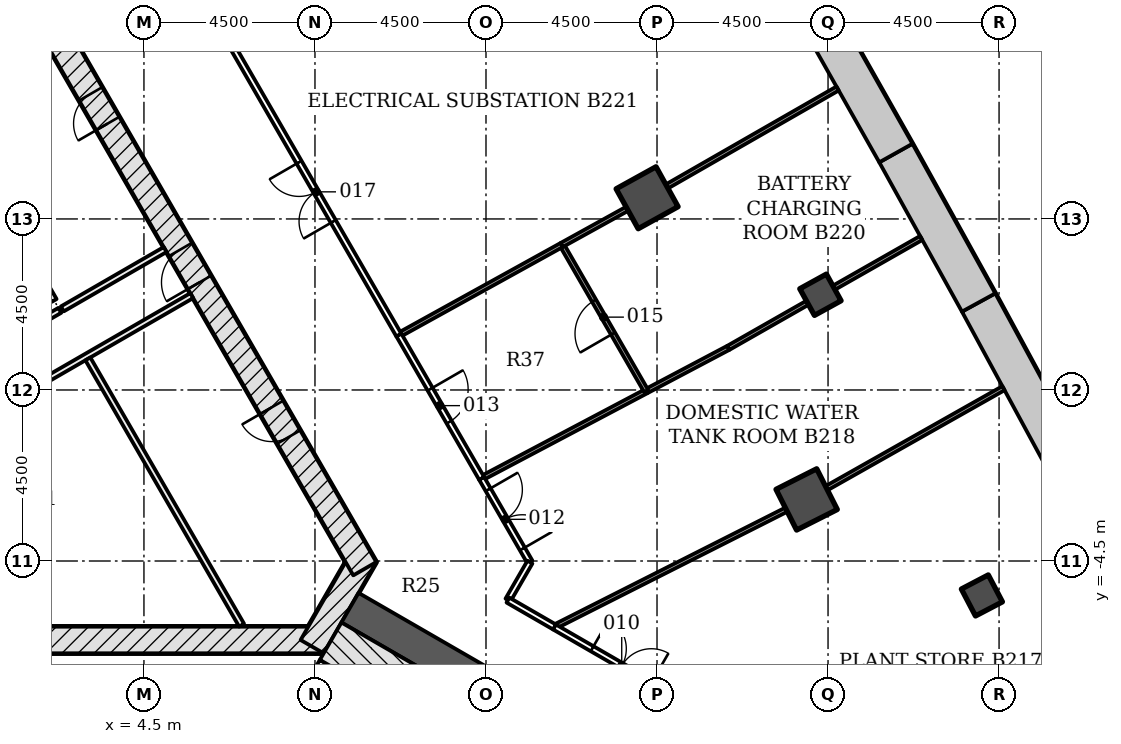
"""IFC4 building model, lengths in metres.
Left out: names, types, materials, properties, quantities, classifications, styles, units other than length and angle.
Written with IfcOpenShell. Run it as: python <this file> out.ifc"""

import sys

from ifc_helpers import new_model, si_unit, direction, frame, frame_2d, origin, origin_2d, place, context, subcontext, project, spatial, polyline, rectangle, outline, extrude, element, fill, save


model = new_model("IFC4")
c1 = context("Model", 3, precision=1e-05, world=origin(), true_north=direction((0.0, 1.0)))
c2 = subcontext(c1, "Body", "Model", "MODEL_VIEW")
j1 = project(units=[si_unit("LENGTHUNIT", "METRE"), si_unit("PLANEANGLEUNIT", "RADIAN")], contexts=[c1])
p1 = place(None, origin())
s1 = spatial("IfcSite", under=j1, at=p1, CompositionType="ELEMENT")
p2 = place(p1, origin())
s2 = spatial("IfcBuilding", under=s1, at=p2, CompositionType="ELEMENT")
p3 = place(p2, frame((0.0, 0.0, -9.0)))
s3 = spatial("IfcBuildingStorey", under=s2, at=p3, CompositionType="ELEMENT", Elevation=-9.0)
p4 = place(p3, origin())
e1 = element("IfcWall", 1, at=p4, inside=s3, PredefinedType="SOLIDWALL", context=c2, shape_type="SweptSolid", body=[
    extrude(outline(polyline([(29.045, -1.415), (26.901, 2.542), (26.024, 2.062), (28.164, -1.887), (29.045, -1.415)])), origin(), (0.0, 0.0, 1.0), 4.2),
])
p5 = place(p3, origin())
e2 = element("IfcWall", 2, at=p5, inside=s3, PredefinedType="SOLIDWALL", context=c2, shape_type="SweptSolid", body=[
    extrude(outline(polyline([(26.901, 2.542), (24.721, 6.479), (23.848, 5.99), (26.024, 2.062), (26.901, 2.542)])), origin(), (0.0, 0.0, 1.0), 4.2),
])
p6 = place(p3, origin())
e3 = element("IfcWall", 3, at=p6, inside=s3, PredefinedType="SOLIDWALL", context=c2, shape_type="SweptSolid", body=[
    extrude(outline(polyline([(24.721, 6.479), (22.506, 10.396), (21.638, 9.9), (23.848, 5.99), (24.721, 6.479)])), origin(), (0.0, 0.0, 1.0), 4.2),
])
for number, where, z_axis, x_axis in (
    (4, (21.937, -2.88, -0.3), (0.0, 0.0, 1.0), (0.893, 0.451, 0.0)),
    (5, (17.739, 5.058, -0.3), (0.0, 0.0, 1.0), (0.875, 0.484, 0.0)),
):
    element("IfcColumn", number, at=place(p3, frame(where, z_axis=z_axis, x_axis=x_axis)), inside=s3, PredefinedType="COLUMN", context=c2, shape_type="SweptSolid", body=[
        extrude(rectangle(XDim=1.2, YDim=1.2, at=origin_2d()), origin(), (0.0, 0.0, 1.0), 4.5),
    ])
for number, where, z_axis, x_axis in (
    (6, (26.548, -5.406, -0.3), (0.0, 0.0, 1.0), (0.886, 0.464, 0.0)),
    (7, (22.3, 2.506, -0.3), (0.0, 0.0, 1.0), (0.876, 0.482, 0.0)),
):
    element("IfcColumn", number, at=place(p3, frame(where, z_axis=z_axis, x_axis=x_axis)), inside=s3, PredefinedType="COLUMN", context=c2, shape_type="SweptSolid", body=[
        extrude(rectangle(XDim=0.8, YDim=0.8, at=origin_2d()), origin(), (0.0, 0.0, 1.0), 4.5),
    ])
p7 = place(p3, frame((-9.229, -6.578, -0.3), z_axis=(0.0, 0.0, 1.0), x_axis=(1.0, 0.0, 0.0)))
e8 = element("IfcWall", 8, at=p7, inside=s3, PredefinedType="SHEAR", context=c2, shape_type="SweptSolid", body=[
    extrude(rectangle(XDim=18.458, YDim=0.7, at=frame_2d((9.229, 0.0))), origin(), (0.0, 0.0, 1.0), 4.5),
])
p8 = place(p3, frame((8.926, -6.753, -0.3), z_axis=(0.0, 0.0, 1.0), x_axis=(0.500042739161, 0.866000726912, 0.0)))
e9 = element("IfcWall", 9, at=p8, inside=s3, PredefinedType="SHEAR", context=c2, shape_type="SweptSolid", body=[
    extrude(rectangle(XDim=2.771, YDim=0.7, at=frame_2d((1.386, 0.0))), origin(), (0.0, 0.0, 1.0), 4.5),
])
p9 = place(p3, frame((10.311, -4.703, -0.3), z_axis=(0.0, 0.0, 1.0), x_axis=(-0.500001446645, 0.866024568562, 0.0)))
e10 = element("IfcWall", 10, at=p9, inside=s3, PredefinedType="SHEAR", context=c2, shape_type="SweptSolid", body=[
    extrude(rectangle(XDim=18.458, YDim=0.7, at=frame_2d((9.229, 0.0))), origin(), (0.0, 0.0, 1.0), 4.5),
])
p10 = place(p9, frame((8.7, 0.0, 0.3)))
e11 = element("IfcOpeningElement", 11, at=p10, cuts=e10, PredefinedType="OPENING", context=c2, shape_type="SweptSolid", body=[
    extrude(rectangle(XDim=1.0, YDim=2.1, at=frame_2d((0.5, 1.05))), frame((0.0, 0.36, 0.0), z_axis=(0.0, -1.0, 0.0), x_axis=(1.0, 0.0, 0.0)), (0.0, 0.0, 1.0), 0.72),
])
p11 = place(p9, frame((4.002, 0.0, 0.3)))
e12 = element("IfcOpeningElement", 12, at=p11, cuts=e10, PredefinedType="OPENING", context=c2, shape_type="SweptSolid", body=[
    extrude(rectangle(XDim=0.9, YDim=2.1, at=frame_2d((0.45, 1.05))), frame((0.0, 0.36, 0.0), z_axis=(0.0, -1.0, 0.0), x_axis=(1.0, 0.0, 0.0)), (0.0, 0.0, 1.0), 0.72),
])
p12 = place(p9, frame((13.527, 0.0, 0.3)))
e13 = element("IfcOpeningElement", 13, at=p12, cuts=e10, PredefinedType="OPENING", context=c2, shape_type="SweptSolid", body=[
    extrude(rectangle(XDim=0.9, YDim=2.1, at=frame_2d((0.45, 1.05))), frame((0.0, 0.36, 0.0), z_axis=(0.0, -1.0, 0.0), x_axis=(1.0, 0.0, 0.0)), (0.0, 0.0, 1.0), 0.72),
])
p13 = place(p3, frame((9.922, -5.728, -0.3), z_axis=(0.0, 0.0, 1.0), x_axis=(0.866028046028, -0.499995423472, 0.0)))
e14 = element("IfcWall", 14, at=p13, inside=s3, PredefinedType="SHEAR", context=c2, shape_type="SweptSolid", body=[
    extrude(rectangle(XDim=14.633, YDim=0.9, at=frame_2d((7.316, 0.0))), origin(), (0.0, 0.0, 1.0), 4.5),
])
p14 = place(p13, frame((7.35, 0.0, 0.3)))
e15 = element("IfcOpeningElement", 15, at=p14, cuts=e14, PredefinedType="OPENING", context=c2, shape_type="SweptSolid", body=[
    extrude(rectangle(XDim=1.5, YDim=2.1, at=frame_2d((0.75, 1.05))), frame((0.0, 0.46, 0.0), z_axis=(0.0, -1.0, 0.0), x_axis=(1.0, 0.0, 0.0)), (0.0, 0.0, 1.0), 0.92),
])
p15 = place(p3, frame((-9.651, -4.797, 0.0), z_axis=(0.0, 0.0, 1.0), x_axis=(0.866023073213, 0.500004036646, 0.0)))
e16 = element("IfcWall", 16, at=p15, inside=s3, PredefinedType="PARTITIONING", context=c2, shape_type="SweptSolid", body=[
    extrude(rectangle(XDim=13.785, YDim=0.15, at=frame_2d((6.892, 0.0))), origin(), (0.0, 0.0, 1.0), 4.2),
])
p16 = place(p15, frame((7.934, 0.0, 0.0)))
e17 = element("IfcOpeningElement", 17, at=p16, cuts=e16, PredefinedType="OPENING", context=c2, shape_type="SweptSolid", body=[
    extrude(rectangle(XDim=0.9, YDim=2.1, at=frame_2d((0.45, 1.05))), frame((0.0, 0.085, 0.0), z_axis=(0.0, -1.0, 0.0), x_axis=(1.0, 0.0, 0.0)), (0.0, 0.0, 1.0), 0.17),
])
p17 = place(p3, frame((-6.366, -4.517, 0.0), z_axis=(0.0, 0.0, 1.0), x_axis=(0.866023831006, 0.500002724122, 0.0)))
e18 = element("IfcWall", 18, at=p17, inside=s3, PredefinedType="PARTITIONING", context=c2, shape_type="SweptSolid", body=[
    extrude(rectangle(XDim=14.0, YDim=0.15, at=frame_2d((7.0, 0.0))), origin(), (0.0, 0.0, 1.0), 4.2),
])
p18 = place(p17, frame((4.951, 0.0, 0.0)))
e19 = element("IfcOpeningElement", 19, at=p18, cuts=e18, PredefinedType="OPENING", context=c2, shape_type="SweptSolid", body=[
    extrude(rectangle(XDim=0.9, YDim=2.1, at=frame_2d((0.45, 1.05))), frame((0.0, 0.085, 0.0), z_axis=(0.0, -1.0, 0.0), x_axis=(1.0, 0.0, 0.0)), (0.0, 0.0, 1.0), 0.17),
])
p19 = place(p3, frame((2.137, 2.355, 0.0), z_axis=(0.0, 0.0, 1.0), x_axis=(-0.500009612796, 0.866019853763, 0.0)))
e20 = element("IfcWall", 20, at=p19, inside=s3, PredefinedType="PARTITIONING", context=c2, shape_type="SweptSolid", body=[
    extrude(rectangle(XDim=7.924, YDim=0.15, at=frame_2d((3.962, 0.0))), origin(), (0.0, 0.0, 1.0), 4.2),
])
p20 = place(p3, frame((2.352, 2.133, 0.0), z_axis=(0.0, 0.0, 1.0), x_axis=(0.866042488821, 0.49997040668, 0.0)))
e21 = element("IfcWall", 21, at=p20, inside=s3, PredefinedType="PARTITIONING", context=c2, shape_type="SweptSolid", body=[
    extrude(rectangle(XDim=3.125, YDim=0.15, at=frame_2d((1.562, 0.0))), origin(), (0.0, 0.0, 1.0), 4.2),
])
p21 = place(p3, frame((7.07, -6.189, 0.0), z_axis=(0.0, 0.0, 1.0), x_axis=(-0.499997568964, 0.866026807339, 0.0)))
e22 = element("IfcWall", 22, at=p21, inside=s3, PredefinedType="PARTITIONING", context=c2, shape_type="SweptSolid", body=[
    extrude(rectangle(XDim=8.091, YDim=0.15, at=frame_2d((4.046, 0.0))), origin(), (0.0, 0.0, 1.0), 4.2),
])
p22 = place(p3, frame((7.44, -10.226, -0.3), z_axis=(0.0, 0.0, 1.0), x_axis=(0.500022077904, 0.866012656725, 0.0)))
e23 = element("IfcWall", 23, at=p22, inside=s3, PredefinedType="SHEAR", context=c2, shape_type="SweptSolid", body=[
    extrude(rectangle(XDim=3.55, YDim=0.2, at=frame_2d((1.775, 0.0))), origin(), (0.0, 0.0, 1.0), 4.5),
])
p23 = place(p22, frame((1.175, 0.0, 0.3)))
e24 = element("IfcOpeningElement", 24, at=p23, cuts=e23, PredefinedType="OPENING", context=c2, shape_type="SweptSolid", body=[
    extrude(rectangle(XDim=1.2, YDim=2.1, at=frame_2d((0.6, 1.05))), frame((0.0, 0.11, 0.0), z_axis=(0.0, -1.0, 0.0), x_axis=(1.0, 0.0, 0.0)), (0.0, 0.0, 1.0), 0.22),
])
p24 = place(p3, frame((9.413, -6.61, -0.3), z_axis=(0.0, 0.0, 1.0), x_axis=(0.866018442252, -0.500012057535, 0.0)))
e25 = element("IfcWall", 25, at=p24, inside=s3, PredefinedType="SHEAR", context=c2, shape_type="SweptSolid", body=[
    extrude(rectangle(XDim=7.2, YDim=1.136, at=frame_2d((3.6, 0.0))), origin(), (0.0, 0.0, 1.0), 4.5),
])
p25 = place(p3, frame((21.401, -3.15, 0.0), z_axis=(0.0, 0.0, 1.0), x_axis=(-0.892483368892, -0.451080299117, 0.0)))
e26 = element("IfcWall", 26, at=p25, inside=s3, PredefinedType="PARTITIONING", context=c2, shape_type="SweptSolid", body=[
    extrude(rectangle(XDim=6.837, YDim=0.12, at=frame_2d((3.418, 0.0))), origin(), (0.0, 0.0, 1.0), 3.588),
])
p26 = place(p3, frame((27.116, 0.047, 0.0), z_axis=(0.0, 0.0, 1.0), x_axis=(-0.87056283872, -0.492057256668, 0.0)))
e27 = element("IfcWall", 27, at=p26, inside=s3, PredefinedType="PARTITIONING", context=c2, shape_type="SweptSolid", body=[
    extrude(rectangle(XDim=5.347, YDim=0.12, at=frame_2d((2.674, 0.0))), origin(), (0.0, 0.0, 1.0), 3.583),
])
p27 = place(p3, frame((15.296, -6.233, 0.0), z_axis=(0.0, 0.0, 1.0), x_axis=(0.866035577775, -0.499982377718, 0.0)))
e28 = element("IfcWall", 28, at=p27, inside=s3, PredefinedType="PARTITIONING", context=c2, shape_type="SweptSolid", body=[
    extrude(rectangle(XDim=4.093, YDim=0.15, at=frame_2d((2.046, 0.0))), origin(), (0.0, 0.0, 1.0), 3.588),
])
p28 = place(p27, frame((1.15, 0.0, 0.0)))
e29 = element("IfcOpeningElement", 29, at=p28, cuts=e28, PredefinedType="OPENING", context=c2, shape_type="SweptSolid", body=[
    extrude(rectangle(XDim=1.8, YDim=2.1, at=frame_2d((0.9, 1.05))), frame((0.0, 0.085, 0.0), z_axis=(0.0, -1.0, 0.0), x_axis=(1.0, 0.0, 0.0)), (0.0, 0.0, 1.0), 0.17),
])
p29 = place(p3, frame((17.717, -0.033, 0.0), z_axis=(0.0, 0.0, 1.0), x_axis=(-0.884034960309, -0.467420783611, 0.0)))
e30 = element("IfcWall", 30, at=p29, inside=s3, PredefinedType="PARTITIONING", context=c2, shape_type="SweptSolid", body=[
    extrude(rectangle(XDim=4.901, YDim=0.12, at=frame_2d((2.451, 0.0))), origin(), (0.0, 0.0, 1.0), 3.588),
])
p30 = place(p3, frame((13.382, -2.321, 0.0), z_axis=(0.0, 0.0, 1.0), x_axis=(0.500076401611, -0.8659812888, 0.0)))
e31 = element("IfcWall", 31, at=p30, inside=s3, PredefinedType="PARTITIONING", context=c2, shape_type="SweptSolid", body=[
    extrude(rectangle(XDim=2.547, YDim=0.15, at=frame_2d((1.274, 0.0))), origin(), (0.0, 0.0, 1.0), 3.588),
])
p31 = place(p30, frame((0.35, 0.0, 0.0)))
e32 = element("IfcOpeningElement", 32, at=p31, cuts=e31, PredefinedType="OPENING", context=c2, shape_type="SweptSolid", body=[
    extrude(rectangle(XDim=1.8, YDim=2.1, at=frame_2d((0.9, 1.05))), frame((0.0, 0.085, 0.0), z_axis=(0.0, -1.0, 0.0), x_axis=(1.0, 0.0, 0.0)), (0.0, 0.0, 1.0), 0.17),
])
p32 = place(p3, frame((14.656, -4.529, 0.0), z_axis=(0.0, 0.0, 1.0), x_axis=(-0.500502949238, -0.865734831114, 0.0)))
e33 = element("IfcWall", 33, at=p32, inside=s3, PredefinedType="PARTITIONING", context=c2, shape_type="SweptSolid", body=[
    extrude(rectangle(XDim=1.155, YDim=0.15, at=frame_2d((0.578, 0.0))), origin(), (0.0, 0.0, 1.0), 4.2),
])
p33 = place(p3, frame((14.078, -5.529, 0.0), z_axis=(0.0, 0.0, 1.0), x_axis=(0.866110865696, -0.499851946404, 0.0)))
e34 = element("IfcWall", 34, at=p33, inside=s3, PredefinedType="PARTITIONING", context=c2, shape_type="SweptSolid", body=[
    extrude(rectangle(XDim=1.415, YDim=0.15, at=frame_2d((0.707, 0.0))), origin(), (0.0, 0.0, 1.0), 3.588),
])
p34 = place(p3, frame((21.959, 2.295, 0.0), z_axis=(0.0, 0.0, 1.0), x_axis=(-0.868831589773, -0.49510773435, 0.0)))
e35 = element("IfcWall", 35, at=p34, inside=s3, PredefinedType="PARTITIONING", context=c2, shape_type="SweptSolid", body=[
    extrude(rectangle(XDim=2.397, YDim=0.12, at=frame_2d((1.199, 0.0))), origin(), (0.0, 0.0, 1.0), 3.588),
])
p35 = place(p3, frame((19.875, 1.108, 0.0), z_axis=(0.0, 0.0, 1.0), x_axis=(-0.884133328187, -0.467234692621, 0.0)))
e36 = element("IfcWall", 36, at=p35, inside=s3, PredefinedType="PARTITIONING", context=c2, shape_type="SweptSolid", body=[
    extrude(rectangle(XDim=2.44, YDim=0.12, at=frame_2d((1.22, 0.0))), origin(), (0.0, 0.0, 1.0), 3.588),
])
p36 = place(p3, frame((24.951, 3.999, 0.0), z_axis=(0.0, 0.0, 1.0), x_axis=(-0.868958412069, -0.494885116057, 0.0)))
e37 = element("IfcWall", 37, at=p36, inside=s3, PredefinedType="PARTITIONING", context=c2, shape_type="SweptSolid", body=[
    extrude(rectangle(XDim=2.643, YDim=0.12, at=frame_2d((1.322, 0.0))), origin(), (0.0, 0.0, 1.0), 4.2),
])
p37 = place(p3, frame((11.205, 1.45, 0.0), z_axis=(0.0, 0.0, 1.0), x_axis=(0.500058412813, -0.865991676505, 0.0)))
e38 = element("IfcWall", 38, at=p37, inside=s3, PredefinedType="PARTITIONING", context=c2, shape_type="SweptSolid", body=[
    extrude(rectangle(XDim=4.361, YDim=0.15, at=frame_2d((2.181, 0.0))), origin(), (0.0, 0.0, 1.0), 3.588),
])
p38 = place(p37, frame((1.65, 0.0, 0.0)))
e39 = element("IfcOpeningElement", 39, at=p38, cuts=e38, PredefinedType="OPENING", context=c2, shape_type="SweptSolid", body=[
    extrude(rectangle(XDim=1.0, YDim=2.1, at=frame_2d((0.5, 1.05))), frame((0.0, 0.085, 0.0), z_axis=(0.0, -1.0, 0.0), x_axis=(1.0, 0.0, 0.0)), (0.0, 0.0, 1.0), 0.17),
])
p39 = place(p3, frame((17.717, -0.032, 0.0), z_axis=(0.0, 0.0, 1.0), x_axis=(-0.499892115999, 0.866087681682, 0.0)))
e40 = element("IfcWall", 40, at=p39, inside=s3, PredefinedType="PARTITIONING", context=c2, shape_type="SweptSolid", body=[
    extrude(rectangle(XDim=4.443, YDim=0.12, at=frame_2d((2.221, 0.0))), origin(), (0.0, 0.0, 1.0), 3.588),
])
p40 = place(p39, frame((1.75, 0.0, 0.0)))
e41 = element("IfcOpeningElement", 41, at=p40, cuts=e40, PredefinedType="OPENING", context=c2, shape_type="SweptSolid", body=[
    extrude(rectangle(XDim=1.0, YDim=2.1, at=frame_2d((0.5, 1.05))), frame((0.0, 0.07, 0.0), z_axis=(0.0, -1.0, 0.0), x_axis=(1.0, 0.0, 0.0)), (0.0, 0.0, 1.0), 0.14),
])
p41 = place(p3, frame((15.5, 3.819, 0.0), z_axis=(0.0, 0.0, 1.0), x_axis=(-0.875141691654, -0.483866737365, 0.0)))
e42 = element("IfcWall", 42, at=p41, inside=s3, PredefinedType="PARTITIONING", context=c2, shape_type="SweptSolid", body=[
    extrude(rectangle(XDim=4.904, YDim=0.12, at=frame_2d((2.452, 0.0))), origin(), (0.0, 0.0, 1.0), 3.588),
])
p42 = place(p3, frame((11.206, 1.446, 0.0), z_axis=(0.0, 0.0, 1.0), x_axis=(-0.499983976786, 0.866034654594, 0.0)))
e43 = element("IfcWall", 43, at=p42, inside=s3, PredefinedType="PARTITIONING", context=c2, shape_type="SweptSolid", body=[
    extrude(rectangle(XDim=8.7, YDim=0.15, at=frame_2d((4.35, 0.0))), origin(), (0.0, 0.0, 1.0), 3.588),
])
p43 = place(p42, frame((3.45, 0.0, 0.0)))
e44 = element("IfcOpeningElement", 44, at=p43, cuts=e43, PredefinedType="OPENING", context=c2, shape_type="SweptSolid", body=[
    extrude(rectangle(XDim=1.8, YDim=2.1, at=frame_2d((0.9, 1.05))), frame((0.0, 0.085, 0.0), z_axis=(0.0, -1.0, 0.0), x_axis=(1.0, 0.0, 0.0)), (0.0, 0.0, 1.0), 0.17),
])
p44 = place(p3, frame((17.214, 4.767, 0.0), z_axis=(0.0, 0.0, 1.0), x_axis=(-0.875150297984, -0.48385117127, 0.0)))
e45 = element("IfcWall", 45, at=p44, inside=s3, PredefinedType="PARTITIONING", context=c2, shape_type="SweptSolid", body=[
    extrude(rectangle(XDim=1.968, YDim=0.12, at=frame_2d((0.984, 0.0))), origin(), (0.0, 0.0, 1.0), 3.588),
])
p45 = place(p3, frame((22.751, 7.932, 0.0), z_axis=(0.0, 0.0, 1.0), x_axis=(-0.867438170848, -0.497544992695, 0.0)))
e46 = element("IfcWall", 46, at=p45, inside=s3, PredefinedType="PARTITIONING", context=c2, shape_type="SweptSolid", body=[
    extrude(rectangle(XDim=5.177, YDim=0.12, at=frame_2d((2.589, 0.0))), origin(), (0.0, 0.0, 1.0), 3.583),
])
p46 = place(p10, origin())
e47 = element("IfcDoor", 47, at=p46, inside=s3, OperationType="SINGLE_SWING_LEFT", PredefinedType="DOOR", context=c2, shape_type="SweptSolid", body=[
    extrude(rectangle(XDim=1.0, YDim=2.1, at=frame_2d((0.5, 1.05))), frame((0.0, 0.075, 0.0), z_axis=(0.0, -1.0, 0.0), x_axis=(1.0, 0.0, 0.0)), (0.0, 0.0, 1.0), 0.15),
])
fill(e11, e47)
p47 = place(p11, origin())
e48 = element("IfcDoor", 48, at=p47, inside=s3, OperationType="SINGLE_SWING_RIGHT", PredefinedType="DOOR", context=c2, shape_type="SweptSolid", body=[
    extrude(rectangle(XDim=0.9, YDim=2.1, at=frame_2d((0.45, 1.05))), frame((0.0, 0.075, 0.0), z_axis=(0.0, -1.0, 0.0), x_axis=(1.0, 0.0, 0.0)), (0.0, 0.0, 1.0), 0.15),
])
fill(e12, e48)
p48 = place(p12, origin())
e49 = element("IfcDoor", 49, at=p48, inside=s3, OperationType="SINGLE_SWING_LEFT", PredefinedType="DOOR", context=c2, shape_type="SweptSolid", body=[
    extrude(rectangle(XDim=0.9, YDim=2.1, at=frame_2d((0.45, 1.05))), frame((0.0, 0.075, 0.0), z_axis=(0.0, -1.0, 0.0), x_axis=(1.0, 0.0, 0.0)), (0.0, 0.0, 1.0), 0.15),
])
fill(e13, e49)
p49 = place(p28, origin())
e50 = element("IfcDoor", 50, at=p49, inside=s3, OperationType="DOUBLE_DOOR_SINGLE_SWING", PredefinedType="DOOR", context=c2, shape_type="SweptSolid", body=[
    extrude(rectangle(XDim=1.8, YDim=2.1, at=frame_2d((0.9, 1.05))), frame((0.0, 0.025, 0.0), z_axis=(0.0, -1.0, 0.0), x_axis=(1.0, 0.0, 0.0)), (0.0, 0.0, 1.0), 0.05),
])
fill(e29, e50)
p50 = place(p31, origin())
e51 = element("IfcDoor", 51, at=p50, inside=s3, OperationType="DOUBLE_DOOR_SINGLE_SWING", PredefinedType="DOOR", context=c2, shape_type="SweptSolid", body=[
    extrude(rectangle(XDim=1.8, YDim=2.1, at=frame_2d((0.9, 1.05))), frame((0.0, 0.025, 0.0), z_axis=(0.0, -1.0, 0.0), x_axis=(1.0, 0.0, 0.0)), (0.0, 0.0, 1.0), 0.05),
])
fill(e32, e51)
p51 = place(p38, origin())
e52 = element("IfcDoor", 52, at=p51, inside=s3, OperationType="SINGLE_SWING_LEFT", PredefinedType="DOOR", context=c2, shape_type="SweptSolid", body=[
    extrude(rectangle(XDim=1.0, YDim=2.1, at=frame_2d((0.5, 1.05))), frame((0.0, 0.025, 0.0), z_axis=(0.0, -1.0, 0.0), x_axis=(1.0, 0.0, 0.0)), (0.0, 0.0, 1.0), 0.05),
])
fill(e39, e52)
p52 = place(p40, origin())
e53 = element("IfcDoor", 53, at=p52, inside=s3, OperationType="SINGLE_SWING_LEFT", PredefinedType="DOOR", context=c2, shape_type="SweptSolid", body=[
    extrude(rectangle(XDim=1.0, YDim=2.1, at=frame_2d((0.5, 1.05))), frame((0.0, 0.025, 0.0), z_axis=(0.0, -1.0, 0.0), x_axis=(1.0, 0.0, 0.0)), (0.0, 0.0, 1.0), 0.05),
])
fill(e41, e53)
p53 = place(p43, origin())
e54 = element("IfcDoor", 54, at=p53, inside=s3, OperationType="DOUBLE_DOOR_SINGLE_SWING", PredefinedType="DOOR", context=c2, shape_type="SweptSolid", body=[
    extrude(rectangle(XDim=1.8, YDim=2.1, at=frame_2d((0.9, 1.05))), frame((0.0, 0.025, 0.0), z_axis=(0.0, -1.0, 0.0), x_axis=(1.0, 0.0, 0.0)), (0.0, 0.0, 1.0), 0.05),
])
fill(e44, e54)
save(model, sys.argv[1])
